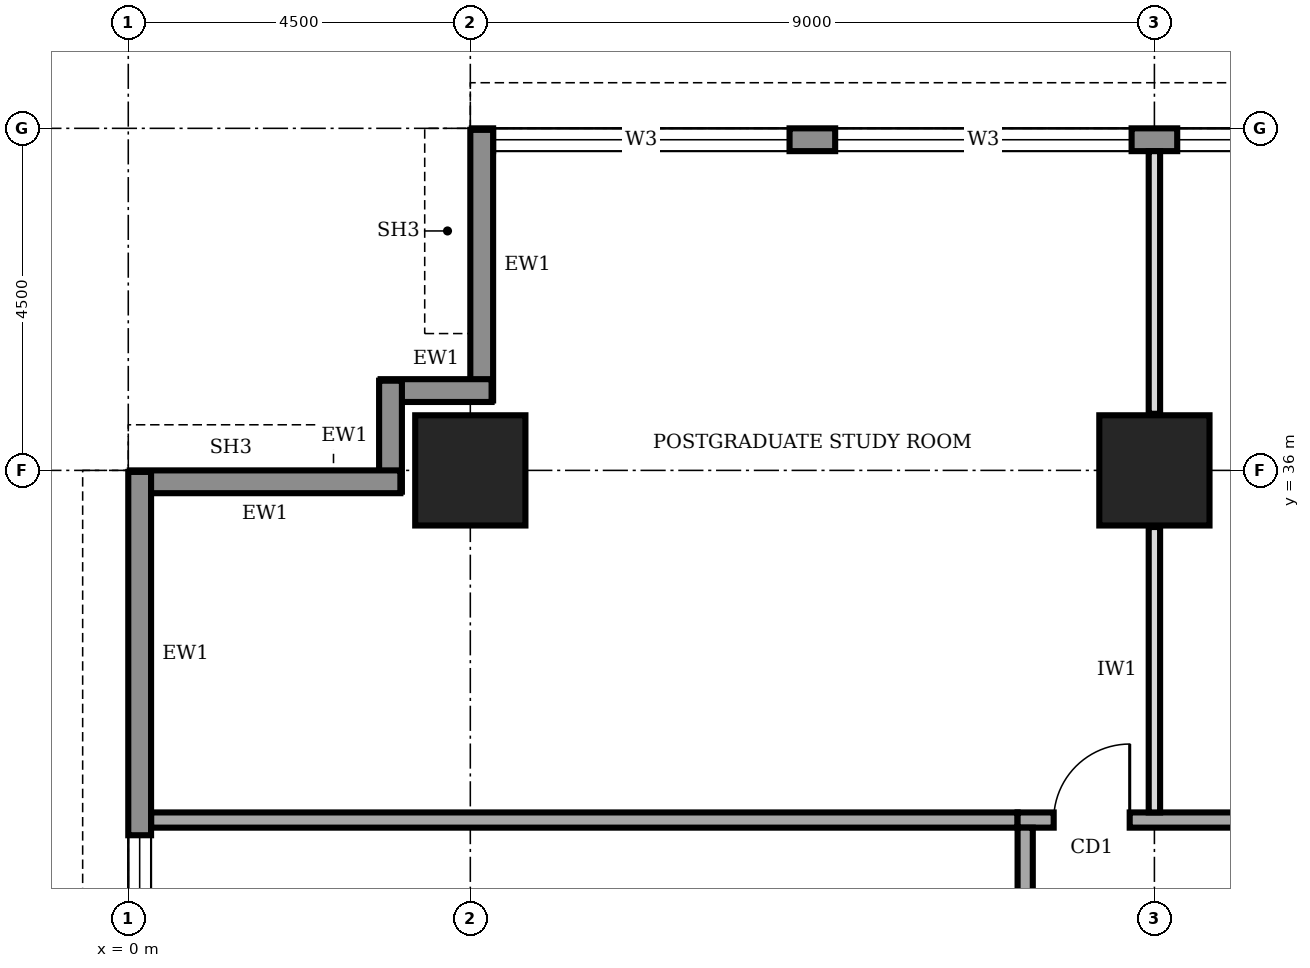
"""IFC4 building model, lengths in metres.
Left out: names, types, materials, properties, quantities, classifications, styles, units other than length and angle.
Written with IfcOpenShell. Run it as: python <this file> out.ifc"""

import sys

from ifc_helpers import new_model, si_unit, direction, frame, frame_2d, origin, origin_2d, place, context, subcontext, project, spatial, rectangle, extrude, element, fill, save


model = new_model("IFC4")
c1 = context("Model", 3, precision=1e-05, world=origin(), true_north=direction((0.0, 1.0)))
c2 = subcontext(c1, "Body", "Model", "MODEL_VIEW")
j1 = project(units=[si_unit("LENGTHUNIT", "METRE"), si_unit("PLANEANGLEUNIT", "RADIAN")], contexts=[c1])
p1 = place(None, origin())
s1 = spatial("IfcSite", under=j1, at=p1, CompositionType="ELEMENT")
p2 = place(p1, origin())
s2 = spatial("IfcBuilding", under=s1, at=p2, CompositionType="ELEMENT")
p3 = place(p2, frame((0.0, 0.0, 257.0)))
s3 = spatial("IfcBuildingStorey", under=s2, at=p3, CompositionType="ELEMENT", Elevation=257.0)
for number, where, z_axis, x_axis in (
    (1, (4.5, 36.0, 0.0), (0.0, 0.0, 1.0), (1.0, 0.0, 0.0)),
    (2, (13.5, 36.0, 0.0), (0.0, 0.0, 1.0), (1.0, 0.0, 0.0)),
):
    element("IfcColumn", number, at=place(p3, frame(where, z_axis=z_axis, x_axis=x_axis)), inside=s3, PredefinedType="COLUMN", context=c2, shape_type="SweptSolid", body=[
        extrude(rectangle(XDim=1.45, YDim=1.45, at=origin_2d()), origin(), (0.0, 0.0, 1.0), 4.0),
    ])
p4 = place(p3, frame((35.98, 40.35, 0.0), z_axis=(0.0, 0.0, 1.0), x_axis=(-1.0, 0.0, 0.0)))
e3 = element("IfcWall", 3, at=p4, inside=s3, PredefinedType="STANDARD", context=c2, shape_type="SweptSolid", body=[
    extrude(rectangle(XDim=31.46, YDim=0.3, at=frame_2d((15.73, 0.0))), origin(), (0.0, 0.0, 1.0), 3.75),
])
p5 = place(p4, frame((27.28, 0.0, 0.95)))
e4 = element("IfcOpeningElement", 4, at=p5, cuts=e3, PredefinedType="OPENING", context=c2, shape_type="SweptSolid", body=[
    extrude(rectangle(XDim=3.9, YDim=1.8, at=frame_2d((1.95, 0.9))), frame((0.0, 0.16, 0.0), z_axis=(0.0, -1.0, 0.0), x_axis=(1.0, 0.0, 0.0)), (0.0, 0.0, 1.0), 0.32),
])
p6 = place(p4, frame((22.78, 0.0, 0.95)))
e5 = element("IfcOpeningElement", 5, at=p6, cuts=e3, PredefinedType="OPENING", context=c2, shape_type="SweptSolid", body=[
    extrude(rectangle(XDim=3.9, YDim=1.8, at=frame_2d((1.95, 0.9))), frame((0.0, 0.16, 0.0), z_axis=(0.0, -1.0, 0.0), x_axis=(1.0, 0.0, 0.0)), (0.0, 0.0, 1.0), 0.32),
])
p7 = place(p4, frame((18.28, 0.0, 0.95)))
e6 = element("IfcOpeningElement", 6, at=p7, cuts=e3, PredefinedType="OPENING", context=c2, shape_type="SweptSolid", body=[
    extrude(rectangle(XDim=3.9, YDim=1.8, at=frame_2d((1.95, 0.9))), frame((0.0, 0.16, 0.0), z_axis=(0.0, -1.0, 0.0), x_axis=(1.0, 0.0, 0.0)), (0.0, 0.0, 1.0), 0.32),
])
p8 = place(p4, frame((13.78, 0.0, 0.95)))
e7 = element("IfcOpeningElement", 7, at=p8, cuts=e3, PredefinedType="OPENING", context=c2, shape_type="SweptSolid", body=[
    extrude(rectangle(XDim=3.9, YDim=1.8, at=frame_2d((1.95, 0.9))), frame((0.0, 0.16, 0.0), z_axis=(0.0, -1.0, 0.0), x_axis=(1.0, 0.0, 0.0)), (0.0, 0.0, 1.0), 0.32),
])
p9 = place(p4, frame((9.28, 0.0, 0.95)))
e8 = element("IfcOpeningElement", 8, at=p9, cuts=e3, PredefinedType="OPENING", context=c2, shape_type="SweptSolid", body=[
    extrude(rectangle(XDim=3.9, YDim=1.8, at=frame_2d((1.95, 0.9))), frame((0.0, 0.16, 0.0), z_axis=(0.0, -1.0, 0.0), x_axis=(1.0, 0.0, 0.0)), (0.0, 0.0, 1.0), 0.32),
])
p10 = place(p4, frame((4.78, 0.0, 0.95)))
e9 = element("IfcOpeningElement", 9, at=p10, cuts=e3, PredefinedType="OPENING", context=c2, shape_type="SweptSolid", body=[
    extrude(rectangle(XDim=3.9, YDim=1.8, at=frame_2d((1.95, 0.9))), frame((0.0, 0.16, 0.0), z_axis=(0.0, -1.0, 0.0), x_axis=(1.0, 0.0, 0.0)), (0.0, 0.0, 1.0), 0.32),
])
p11 = place(p3, frame((4.65, 40.48, 0.0), z_axis=(0.0, 0.0, 1.0), x_axis=(0.0, -1.0, 0.0)))
e10 = element("IfcWall", 10, at=p11, inside=s3, PredefinedType="STANDARD", context=c2, shape_type="SweptSolid", body=[
    extrude(rectangle(XDim=3.56, YDim=0.3, at=frame_2d((1.78, 0.0))), origin(), (0.0, 0.0, 1.0), 2.85),
])
for number, where, z_axis, x_axis in (
    (11, (4.78, 37.05, 0.0), (0.0, 0.0, 1.0), (-1.0, 0.0, 0.0)),
    (12, (3.45, 37.18, 0.0), (0.0, 0.0, 1.0), (0.0, -1.0, 0.0)),
):
    element("IfcWall", number, at=place(p3, frame(where, z_axis=z_axis, x_axis=x_axis)), inside=s3, PredefinedType="STANDARD", context=c2, shape_type="SweptSolid", body=[
        extrude(rectangle(XDim=1.46, YDim=0.3, at=frame_2d((0.73, 0.0))), origin(), (0.0, 0.0, 1.0), 3.75),
    ])
p12 = place(p3, frame((3.58, 35.85, 0.0), z_axis=(0.0, 0.0, 1.0), x_axis=(-1.0, 0.0, 0.0)))
e13 = element("IfcWall", 13, at=p12, inside=s3, PredefinedType="STANDARD", context=c2, shape_type="SweptSolid", body=[
    extrude(rectangle(XDim=3.56, YDim=0.3, at=frame_2d((1.78, 0.0))), origin(), (0.0, 0.0, 1.0), 2.85),
])
p13 = place(p3, frame((0.15, 35.98, 0.0), z_axis=(0.0, 0.0, 1.0), x_axis=(0.0, -1.0, 0.0)))
e14 = element("IfcWall", 14, at=p13, inside=s3, PredefinedType="STANDARD", context=c2, shape_type="SweptSolid", body=[
    extrude(rectangle(XDim=31.46, YDim=0.3, at=frame_2d((15.73, 0.0))), origin(), (0.0, 0.0, 1.0), 3.75),
])
p14 = place(p13, frame((27.28, 0.0, 0.95)))
e15 = element("IfcOpeningElement", 15, at=p14, cuts=e14, PredefinedType="OPENING", context=c2, shape_type="SweptSolid", body=[
    extrude(rectangle(XDim=3.9, YDim=1.8, at=frame_2d((1.95, 0.9))), frame((0.0, 0.16, 0.0), z_axis=(0.0, -1.0, 0.0), x_axis=(1.0, 0.0, 0.0)), (0.0, 0.0, 1.0), 0.32),
])
p15 = place(p13, frame((22.78, 0.0, 0.95)))
e16 = element("IfcOpeningElement", 16, at=p15, cuts=e14, PredefinedType="OPENING", context=c2, shape_type="SweptSolid", body=[
    extrude(rectangle(XDim=3.9, YDim=1.8, at=frame_2d((1.95, 0.9))), frame((0.0, 0.16, 0.0), z_axis=(0.0, -1.0, 0.0), x_axis=(1.0, 0.0, 0.0)), (0.0, 0.0, 1.0), 0.32),
])
p16 = place(p13, frame((18.28, 0.0, 0.95)))
e17 = element("IfcOpeningElement", 17, at=p16, cuts=e14, PredefinedType="OPENING", context=c2, shape_type="SweptSolid", body=[
    extrude(rectangle(XDim=3.9, YDim=1.8, at=frame_2d((1.95, 0.9))), frame((0.0, 0.16, 0.0), z_axis=(0.0, -1.0, 0.0), x_axis=(1.0, 0.0, 0.0)), (0.0, 0.0, 1.0), 0.32),
])
p17 = place(p13, frame((13.78, 0.0, 0.95)))
e18 = element("IfcOpeningElement", 18, at=p17, cuts=e14, PredefinedType="OPENING", context=c2, shape_type="SweptSolid", body=[
    extrude(rectangle(XDim=3.9, YDim=1.8, at=frame_2d((1.95, 0.9))), frame((0.0, 0.16, 0.0), z_axis=(0.0, -1.0, 0.0), x_axis=(1.0, 0.0, 0.0)), (0.0, 0.0, 1.0), 0.32),
])
p18 = place(p13, frame((9.28, 0.0, 0.95)))
e19 = element("IfcOpeningElement", 19, at=p18, cuts=e14, PredefinedType="OPENING", context=c2, shape_type="SweptSolid", body=[
    extrude(rectangle(XDim=3.9, YDim=1.8, at=frame_2d((1.95, 0.9))), frame((0.0, 0.16, 0.0), z_axis=(0.0, -1.0, 0.0), x_axis=(1.0, 0.0, 0.0)), (0.0, 0.0, 1.0), 0.32),
])
p19 = place(p13, frame((4.78, 0.0, 0.95)))
e20 = element("IfcOpeningElement", 20, at=p19, cuts=e14, PredefinedType="OPENING", context=c2, shape_type="SweptSolid", body=[
    extrude(rectangle(XDim=3.9, YDim=1.8, at=frame_2d((1.95, 0.9))), frame((0.0, 0.16, 0.0), z_axis=(0.0, -1.0, 0.0), x_axis=(1.0, 0.0, 0.0)), (0.0, 0.0, 1.0), 0.32),
])
p20 = place(p3, frame((28.6, 31.4, 0.0), z_axis=(0.0, 0.0, 1.0), x_axis=(-1.0, 0.0, 0.0)))
e21 = element("IfcWall", 21, at=p20, inside=s3, PredefinedType="SOLIDWALL", context=c2, shape_type="SweptSolid", body=[
    extrude(rectangle(XDim=16.9, YDim=0.2, at=frame_2d((8.45, 0.0))), origin(), (0.0, 0.0, 1.0), 3.75),
])
p21 = place(p20, frame((15.425, 0.0, 0.0)))
e22 = element("IfcOpeningElement", 22, at=p21, cuts=e21, PredefinedType="OPENING", context=c2, shape_type="SweptSolid", body=[
    extrude(rectangle(XDim=1.0, YDim=2.1, at=frame_2d((0.5, 1.05))), frame((0.0, 0.11, 0.0), z_axis=(0.0, -1.0, 0.0), x_axis=(1.0, 0.0, 0.0)), (0.0, 0.0, 1.0), 0.22),
])
p22 = place(p20, frame((10.1, 0.0, 0.0)))
e23 = element("IfcOpeningElement", 23, at=p22, cuts=e21, PredefinedType="OPENING", context=c2, shape_type="SweptSolid", body=[
    extrude(rectangle(XDim=1.0, YDim=2.1, at=frame_2d((0.5, 1.05))), frame((0.0, 0.11, 0.0), z_axis=(0.0, -1.0, 0.0), x_axis=(1.0, 0.0, 0.0)), (0.0, 0.0, 1.0), 0.22),
])
p23 = place(p20, frame((2.25, 0.0, 0.0)))
e24 = element("IfcOpeningElement", 24, at=p23, cuts=e21, PredefinedType="OPENING", context=c2, shape_type="SweptSolid", body=[
    extrude(rectangle(XDim=1.4, YDim=2.1, at=frame_2d((0.7, 1.05))), frame((0.0, 0.11, 0.0), z_axis=(0.0, -1.0, 0.0), x_axis=(1.0, 0.0, 0.0)), (0.0, 0.0, 1.0), 0.22),
])
p24 = place(p3, frame((11.8, 31.3, 0.0), z_axis=(0.0, 0.0, 1.0), x_axis=(0.0, -1.0, 0.0)))
e25 = element("IfcWall", 25, at=p24, inside=s3, PredefinedType="SOLIDWALL", context=c2, shape_type="SweptSolid", body=[
    extrude(rectangle(XDim=22.3, YDim=0.2, at=frame_2d((11.15, 0.0))), origin(), (0.0, 0.0, 1.0), 3.75),
])
p25 = place(p24, frame((19.55, 0.0, 0.0)))
e26 = element("IfcOpeningElement", 26, at=p25, cuts=e25, PredefinedType="OPENING", context=c2, shape_type="SweptSolid", body=[
    extrude(rectangle(XDim=1.0, YDim=2.1, at=frame_2d((0.5, 1.05))), frame((0.0, 0.11, 0.0), z_axis=(0.0, -1.0, 0.0), x_axis=(1.0, 0.0, 0.0)), (0.0, 0.0, 1.0), 0.22),
])
p26 = place(p24, frame((15.65, 0.0, 0.0)))
e27 = element("IfcOpeningElement", 27, at=p26, cuts=e25, PredefinedType="OPENING", context=c2, shape_type="SweptSolid", body=[
    extrude(rectangle(XDim=0.9, YDim=2.1, at=frame_2d((0.45, 1.05))), frame((0.0, 0.11, 0.0), z_axis=(0.0, -1.0, 0.0), x_axis=(1.0, 0.0, 0.0)), (0.0, 0.0, 1.0), 0.22),
])
p27 = place(p24, frame((10.85, 0.0, 0.0)))
e28 = element("IfcOpeningElement", 28, at=p27, cuts=e25, PredefinedType="OPENING", context=c2, shape_type="SweptSolid", body=[
    extrude(rectangle(XDim=0.9, YDim=2.1, at=frame_2d((0.45, 1.05))), frame((0.0, 0.11, 0.0), z_axis=(0.0, -1.0, 0.0), x_axis=(1.0, 0.0, 0.0)), (0.0, 0.0, 1.0), 0.22),
])
p28 = place(p24, frame((7.8, 0.0, 0.0)))
e29 = element("IfcOpeningElement", 29, at=p28, cuts=e25, PredefinedType="OPENING", context=c2, shape_type="SweptSolid", body=[
    extrude(rectangle(XDim=0.9, YDim=2.1, at=frame_2d((0.45, 1.05))), frame((0.0, 0.11, 0.0), z_axis=(0.0, -1.0, 0.0), x_axis=(1.0, 0.0, 0.0)), (0.0, 0.0, 1.0), 0.22),
])
p29 = place(p24, frame((4.8, 0.0, 0.0)))
e30 = element("IfcOpeningElement", 30, at=p29, cuts=e25, PredefinedType="OPENING", context=c2, shape_type="SweptSolid", body=[
    extrude(rectangle(XDim=1.0, YDim=2.1, at=frame_2d((0.5, 1.05))), frame((0.0, 0.11, 0.0), z_axis=(0.0, -1.0, 0.0), x_axis=(1.0, 0.0, 0.0)), (0.0, 0.0, 1.0), 0.22),
])
p30 = place(p24, frame((12.9, 0.0, 0.0)))
e31 = element("IfcOpeningElement", 31, at=p30, cuts=e25, PredefinedType="OPENING", context=c2, shape_type="SweptSolid", body=[
    extrude(rectangle(XDim=1.0, YDim=2.1, at=frame_2d((0.5, 1.05))), frame((0.0, 0.11, 0.0), z_axis=(0.0, -1.0, 0.0), x_axis=(1.0, 0.0, 0.0)), (0.0, 0.0, 1.0), 0.22),
])
p31 = place(p24, frame((1.55, 0.0, 0.0)))
e32 = element("IfcOpeningElement", 32, at=p31, cuts=e25, PredefinedType="OPENING", context=c2, shape_type="SweptSolid", body=[
    extrude(rectangle(XDim=1.0, YDim=2.1, at=frame_2d((0.5, 1.05))), frame((0.0, 0.11, 0.0), z_axis=(0.0, -1.0, 0.0), x_axis=(1.0, 0.0, 0.0)), (0.0, 0.0, 1.0), 0.22),
])
p32 = place(p3, frame((0.3, 31.4, 0.0), z_axis=(0.0, 0.0, 1.0), x_axis=(1.0, 0.0, 0.0)))
e33 = element("IfcWall", 33, at=p32, inside=s3, PredefinedType="SOLIDWALL", context=c2, shape_type="SweptSolid", body=[
    extrude(rectangle(XDim=11.4, YDim=0.2, at=frame_2d((5.7, 0.0))), origin(), (0.0, 0.0, 1.0), 3.75),
])
p33 = place(p3, frame((13.5, 31.5, 0.0), z_axis=(0.0, 0.0, 1.0), x_axis=(0.0, 1.0, 0.0)))
e34 = element("IfcWall", 34, at=p33, inside=s3, PredefinedType="PARTITIONING", context=c2, shape_type="SweptSolid", body=[
    extrude(rectangle(XDim=3.755, YDim=0.15, at=frame_2d((1.877, 0.0))), origin(), (0.0, 0.0, 1.0), 2.85),
])
p34 = place(p3, frame((13.5, 36.745, 0.0), z_axis=(0.0, 0.0, 1.0), x_axis=(0.0, 1.0, 0.0)))
e35 = element("IfcWall", 35, at=p34, inside=s3, PredefinedType="PARTITIONING", context=c2, shape_type="SweptSolid", body=[
    extrude(rectangle(XDim=3.455, YDim=0.15, at=frame_2d((1.728, 0.0))), origin(), (0.0, 0.0, 1.0), 2.85),
])
p35 = place(p5, origin())
e36 = element("IfcWindow", 36, at=p35, inside=s3, PartitioningType="SINGLE_PANEL", PredefinedType="WINDOW", context=c2, shape_type="SweptSolid", body=[
    extrude(rectangle(XDim=3.9, YDim=1.8, at=frame_2d((1.95, 0.9))), frame((0.0, 0.03, 0.0), z_axis=(0.0, -1.0, 0.0), x_axis=(1.0, 0.0, 0.0)), (0.0, 0.0, 1.0), 0.06),
])
fill(e4, e36)
p36 = place(p6, origin())
e37 = element("IfcWindow", 37, at=p36, inside=s3, PartitioningType="SINGLE_PANEL", PredefinedType="WINDOW", context=c2, shape_type="SweptSolid", body=[
    extrude(rectangle(XDim=3.9, YDim=1.8, at=frame_2d((1.95, 0.9))), frame((0.0, 0.03, 0.0), z_axis=(0.0, -1.0, 0.0), x_axis=(1.0, 0.0, 0.0)), (0.0, 0.0, 1.0), 0.06),
])
fill(e5, e37)
p37 = place(p7, origin())
e38 = element("IfcWindow", 38, at=p37, inside=s3, PartitioningType="SINGLE_PANEL", PredefinedType="WINDOW", context=c2, shape_type="SweptSolid", body=[
    extrude(rectangle(XDim=3.9, YDim=1.8, at=frame_2d((1.95, 0.9))), frame((0.0, 0.03, 0.0), z_axis=(0.0, -1.0, 0.0), x_axis=(1.0, 0.0, 0.0)), (0.0, 0.0, 1.0), 0.06),
])
fill(e6, e38)
p38 = place(p19, origin())
e39 = element("IfcWindow", 39, at=p38, inside=s3, PartitioningType="SINGLE_PANEL", PredefinedType="WINDOW", context=c2, shape_type="SweptSolid", body=[
    extrude(rectangle(XDim=3.9, YDim=1.8, at=frame_2d((1.95, 0.9))), frame((0.0, 0.03, 0.0), z_axis=(0.0, -1.0, 0.0), x_axis=(1.0, 0.0, 0.0)), (0.0, 0.0, 1.0), 0.06),
])
fill(e20, e39)
p39 = place(p21, frame((1.0, 0.0, 0.0), z_axis=(0.0, 0.0, 1.0), x_axis=(-1.0, 0.0, 0.0)))
e40 = element("IfcDoor", 40, at=p39, inside=s3, OperationType="SINGLE_SWING_RIGHT", PredefinedType="DOOR", context=c2, shape_type="SweptSolid", body=[
    extrude(rectangle(XDim=1.0, YDim=2.1, at=frame_2d((0.5, 1.05))), frame((0.0, 0.025, 0.0), z_axis=(0.0, -1.0, 0.0), x_axis=(1.0, 0.0, 0.0)), (0.0, 0.0, 1.0), 0.05),
])
fill(e22, e40)
save(model, sys.argv[1])
